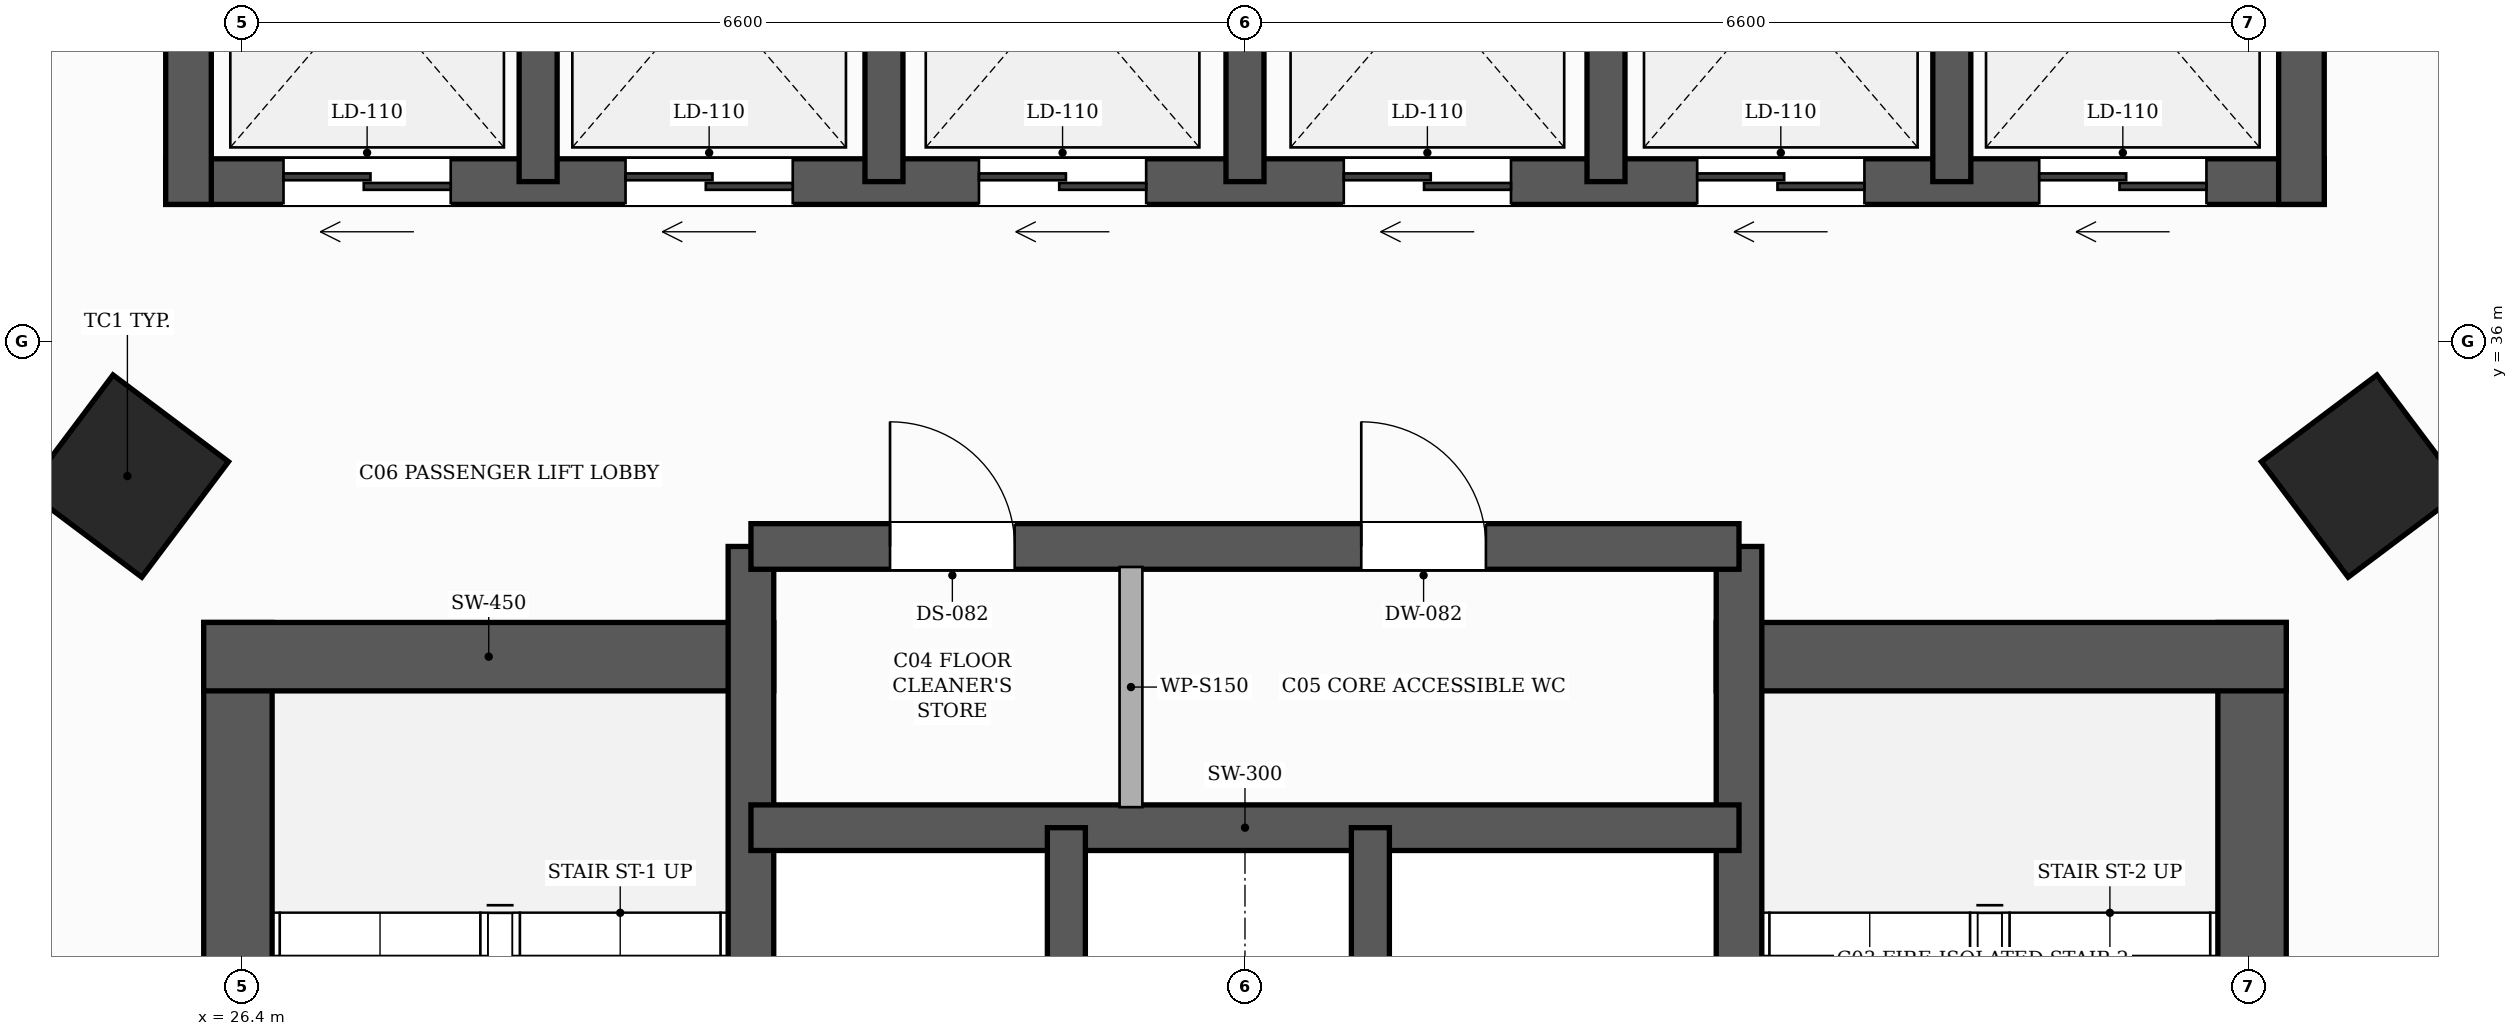
"""IFC4 building model, lengths in metres.
Left out: names, types, materials, properties, quantities, classifications, styles, units other than length and angle.
Written with IfcOpenShell. Run it as: python <this file> out.ifc"""

import sys

from ifc_helpers import new_model, si_unit, direction, frame, frame_2d, origin, origin_2d, place, context, subcontext, project, spatial, rectangle, hollow_rectangle, extrude, element, fill, save


model = new_model("IFC4")
c1 = context("Model", 3, precision=1e-05, world=origin(), true_north=direction((0.0, 1.0)))
c2 = subcontext(c1, "Body", "Model", "MODEL_VIEW")
j1 = project(units=[si_unit("LENGTHUNIT", "METRE"), si_unit("PLANEANGLEUNIT", "RADIAN")], contexts=[c1])
p1 = place(None, origin())
s1 = spatial("IfcSite", under=j1, at=p1, CompositionType="ELEMENT")
p2 = place(p1, origin())
s2 = spatial("IfcBuilding", under=s1, at=p2, CompositionType="ELEMENT")
p3 = place(p2, origin())
s3 = spatial("IfcBuildingStorey", under=s2, at=p3, CompositionType="ELEMENT", Elevation=0.0)
p4 = place(p3, frame((26.375, 26.45, 0.0), z_axis=(0.0, 0.0, 1.0), x_axis=(0.0, 1.0, 0.0)))
e1 = element("IfcWall", 1, at=p4, inside=s3, PredefinedType="SHEAR", context=c2, shape_type="SweptSolid", body=[
    extrude(rectangle(XDim=7.7, YDim=0.45, at=frame_2d((3.85, 0.0))), origin(), (0.0, 0.0, 1.0), 5.5),
])
p5 = place(p3, frame((26.15, 33.925, 0.0), z_axis=(0.0, 0.0, 1.0), x_axis=(1.0, 0.0, 0.0)))
e2 = element("IfcWall", 2, at=p5, inside=s3, PredefinedType="SHEAR", context=c2, shape_type="SweptSolid", body=[
    extrude(rectangle(XDim=3.75, YDim=0.45, at=frame_2d((1.875, 0.0))), origin(), (0.0, 0.0, 1.0), 5.5),
])
p6 = place(p3, frame((39.625, 26.45, 0.0), z_axis=(0.0, 0.0, 1.0), x_axis=(0.0, 1.0, 0.0)))
e3 = element("IfcWall", 3, at=p6, inside=s3, PredefinedType="SHEAR", context=c2, shape_type="SweptSolid", body=[
    extrude(rectangle(XDim=7.7, YDim=0.45, at=frame_2d((3.85, 0.0))), origin(), (0.0, 0.0, 1.0), 5.5),
])
p7 = place(p3, frame((36.1, 33.925, 0.0), z_axis=(0.0, 0.0, 1.0), x_axis=(1.0, 0.0, 0.0)))
e4 = element("IfcWall", 4, at=p7, inside=s3, PredefinedType="SHEAR", context=c2, shape_type="SweptSolid", body=[
    extrude(rectangle(XDim=3.75, YDim=0.45, at=frame_2d((1.875, 0.0))), origin(), (0.0, 0.0, 1.0), 5.5),
])
p8 = place(p3, frame((29.75, 26.45, 0.0), z_axis=(0.0, 0.0, 1.0), x_axis=(0.0, 1.0, 0.0)))
e5 = element("IfcWall", 5, at=p8, inside=s3, PredefinedType="SHEAR", context=c2, shape_type="SweptSolid", body=[
    extrude(rectangle(XDim=8.2, YDim=0.3, at=frame_2d((4.1, 0.0))), origin(), (0.0, 0.0, 1.0), 5.5),
])
p9 = place(p8, frame((0.6, 0.0, 0.0)))
e6 = element("IfcOpeningElement", 6, at=p9, cuts=e5, PredefinedType="OPENING", context=c2, shape_type="SweptSolid", body=[
    extrude(rectangle(XDim=1.05, YDim=2.15, at=frame_2d((0.525, 1.075))), frame((0.0, 0.16, 0.0), z_axis=(0.0, -1.0, 0.0), x_axis=(1.0, 0.0, 0.0)), (0.0, 0.0, 1.0), 0.32),
])
p10 = place(p3, frame((36.25, 26.45, 0.0), z_axis=(0.0, 0.0, 1.0), x_axis=(0.0, 1.0, 0.0)))
e7 = element("IfcWall", 7, at=p10, inside=s3, PredefinedType="SHEAR", context=c2, shape_type="SweptSolid", body=[
    extrude(rectangle(XDim=8.2, YDim=0.3, at=frame_2d((4.1, 0.0))), origin(), (0.0, 0.0, 1.0), 5.5),
])
p11 = place(p10, frame((0.6, 0.0, 0.0)))
e8 = element("IfcOpeningElement", 8, at=p11, cuts=e7, PredefinedType="OPENING", context=c2, shape_type="SweptSolid", body=[
    extrude(rectangle(XDim=1.05, YDim=2.15, at=frame_2d((0.525, 1.075))), frame((0.0, 0.16, 0.0), z_axis=(0.0, -1.0, 0.0), x_axis=(1.0, 0.0, 0.0)), (0.0, 0.0, 1.0), 0.32),
])
p12 = place(p3, frame((29.75, 32.8, 0.0), z_axis=(0.0, 0.0, 1.0), x_axis=(1.0, 0.0, 0.0)))
e9 = element("IfcWall", 9, at=p12, inside=s3, PredefinedType="SHEAR", context=c2, shape_type="SweptSolid", body=[
    extrude(rectangle(XDim=6.5, YDim=0.3, at=frame_2d((3.25, 0.0))), origin(), (0.0, 0.0, 1.0), 5.5),
])
for number, where, z_axis, x_axis in (
    (10, (31.825, 29.9, 0.0), (0.0, 0.0, 1.0), (0.0, 1.0, 0.0)),
    (11, (33.825, 29.9, 0.0), (0.0, 0.0, 1.0), (0.0, 1.0, 0.0)),
):
    element("IfcWall", number, at=place(p3, frame(where, z_axis=z_axis, x_axis=x_axis)), inside=s3, PredefinedType="SHEAR", context=c2, shape_type="SweptSolid", body=[
        extrude(rectangle(XDim=2.9, YDim=0.25, at=frame_2d((1.45, 0.0))), origin(), (0.0, 0.0, 1.0), 5.5),
    ])
p13 = place(p3, frame((29.75, 34.65, 0.0), z_axis=(0.0, 0.0, 1.0), x_axis=(1.0, 0.0, 0.0)))
e12 = element("IfcWall", 12, at=p13, inside=s3, PredefinedType="SHEAR", context=c2, shape_type="SweptSolid", body=[
    extrude(rectangle(XDim=6.5, YDim=0.3, at=frame_2d((3.25, 0.0))), origin(), (0.0, 0.0, 1.0), 5.5),
])
p14 = place(p13, frame((0.915, 0.0, 0.0)))
e13 = element("IfcOpeningElement", 13, at=p14, cuts=e12, PredefinedType="OPENING", context=c2, shape_type="SweptSolid", body=[
    extrude(rectangle(XDim=0.82, YDim=2.1, at=frame_2d((0.41, 1.05))), frame((0.0, 0.16, 0.0), z_axis=(0.0, -1.0, 0.0), x_axis=(1.0, 0.0, 0.0)), (0.0, 0.0, 1.0), 0.32),
])
p15 = place(p13, frame((4.015, 0.0, 0.0)))
e14 = element("IfcOpeningElement", 14, at=p15, cuts=e12, PredefinedType="OPENING", context=c2, shape_type="SweptSolid", body=[
    extrude(rectangle(XDim=0.82, YDim=2.1, at=frame_2d((0.41, 1.05))), frame((0.0, 0.16, 0.0), z_axis=(0.0, -1.0, 0.0), x_axis=(1.0, 0.0, 0.0)), (0.0, 0.0, 1.0), 0.32),
])
p16 = place(p3, frame((40.1, 37.05, 0.0), z_axis=(0.0, 0.0, 1.0), x_axis=(-1.0, 0.0, 0.0)))
e15 = element("IfcWall", 15, at=p16, inside=s3, PredefinedType="SHEAR", context=c2, shape_type="SweptSolid", body=[
    extrude(rectangle(XDim=14.2, YDim=0.3, at=frame_2d((7.1, 0.0))), origin(), (0.0, 0.0, 1.0), 5.5),
])
p17 = place(p16, frame((12.325, 0.0, 0.0)))
e16 = element("IfcOpeningElement", 16, at=p17, cuts=e15, PredefinedType="OPENING", context=c2, shape_type="SweptSolid", body=[
    extrude(rectangle(XDim=1.1, YDim=2.2, at=frame_2d((0.55, 1.1))), frame((0.0, 0.16, 0.0), z_axis=(0.0, -1.0, 0.0), x_axis=(1.0, 0.0, 0.0)), (0.0, 0.0, 1.0), 0.32),
])
p18 = place(p16, frame((0.775, 0.0, 0.0)))
e17 = element("IfcOpeningElement", 17, at=p18, cuts=e15, PredefinedType="OPENING", context=c2, shape_type="SweptSolid", body=[
    extrude(rectangle(XDim=1.1, YDim=2.2, at=frame_2d((0.55, 1.1))), frame((0.0, 0.16, 0.0), z_axis=(0.0, -1.0, 0.0), x_axis=(1.0, 0.0, 0.0)), (0.0, 0.0, 1.0), 0.32),
])
p19 = place(p16, frame((10.075, 0.0, 0.0)))
e18 = element("IfcOpeningElement", 18, at=p19, cuts=e15, PredefinedType="OPENING", context=c2, shape_type="SweptSolid", body=[
    extrude(rectangle(XDim=1.1, YDim=2.2, at=frame_2d((0.55, 1.1))), frame((0.0, 0.16, 0.0), z_axis=(0.0, -1.0, 0.0), x_axis=(1.0, 0.0, 0.0)), (0.0, 0.0, 1.0), 0.32),
])
p20 = place(p16, frame((3.025, 0.0, 0.0)))
e19 = element("IfcOpeningElement", 19, at=p20, cuts=e15, PredefinedType="OPENING", context=c2, shape_type="SweptSolid", body=[
    extrude(rectangle(XDim=1.1, YDim=2.2, at=frame_2d((0.55, 1.1))), frame((0.0, 0.16, 0.0), z_axis=(0.0, -1.0, 0.0), x_axis=(1.0, 0.0, 0.0)), (0.0, 0.0, 1.0), 0.32),
])
p21 = place(p16, frame((7.75, 0.0, 0.0)))
e20 = element("IfcOpeningElement", 20, at=p21, cuts=e15, PredefinedType="OPENING", context=c2, shape_type="SweptSolid", body=[
    extrude(rectangle(XDim=1.1, YDim=2.2, at=frame_2d((0.55, 1.1))), frame((0.0, 0.16, 0.0), z_axis=(0.0, -1.0, 0.0), x_axis=(1.0, 0.0, 0.0)), (0.0, 0.0, 1.0), 0.32),
])
p22 = place(p16, frame((5.35, 0.0, 0.0)))
e21 = element("IfcOpeningElement", 21, at=p22, cuts=e15, PredefinedType="OPENING", context=c2, shape_type="SweptSolid", body=[
    extrude(rectangle(XDim=1.1, YDim=2.2, at=frame_2d((0.55, 1.1))), frame((0.0, 0.16, 0.0), z_axis=(0.0, -1.0, 0.0), x_axis=(1.0, 0.0, 0.0)), (0.0, 0.0, 1.0), 0.32),
])
for number, where, z_axis, x_axis in (
    (22, (26.05, 36.9, 0.0), (0.0, 0.0, 1.0), (0.0, 1.0, 0.0)),
    (23, (39.95, 36.9, 0.0), (0.0, 0.0, 1.0), (0.0, 1.0, 0.0)),
):
    element("IfcWall", number, at=place(p3, frame(where, z_axis=z_axis, x_axis=x_axis)), inside=s3, PredefinedType="SHEAR", context=c2, shape_type="SweptSolid", body=[
        extrude(rectangle(XDim=2.85, YDim=0.3, at=frame_2d((1.425, 0.0))), origin(), (0.0, 0.0, 1.0), 5.5),
    ])
for number, where, z_axis, x_axis in (
    (24, (28.35, 37.05, 0.0), (0.0, 0.0, 1.0), (0.0, 1.0, 0.0)),
    (25, (30.625, 37.05, 0.0), (0.0, 0.0, 1.0), (0.0, 1.0, 0.0)),
    (26, (33.0, 37.05, 0.0), (0.0, 0.0, 1.0), (0.0, 1.0, 0.0)),
    (27, (35.375, 37.05, 0.0), (0.0, 0.0, 1.0), (0.0, 1.0, 0.0)),
    (28, (37.65, 37.05, 0.0), (0.0, 0.0, 1.0), (0.0, 1.0, 0.0)),
):
    element("IfcWall", number, at=place(p3, frame(where, z_axis=z_axis, x_axis=x_axis)), inside=s3, PredefinedType="SHEAR", context=c2, shape_type="SweptSolid", body=[
        extrude(rectangle(XDim=2.55, YDim=0.25, at=frame_2d((1.275, 0.0))), origin(), (0.0, 0.0, 1.0), 5.5),
    ])
for number, where, z_axis, x_axis in (
    (29, (25.648, 35.113, 0.0), (0.0, 0.0, 1.0), (0.6, 0.8, 0.0)),
    (30, (40.352, 35.113, 0.0), (0.0, 0.0, 1.0), (-0.6, 0.8, 0.0)),
):
    element("IfcColumn", number, at=place(p3, frame(where, z_axis=z_axis, x_axis=x_axis)), inside=s3, PredefinedType="COLUMN", context=c2, shape_type="SweptSolid", body=[
        extrude(hollow_rectangle(XDim=0.95, YDim=0.95, WallThickness=0.032, at=origin_2d()), origin(), (0.0, 0.0, 1.0), 5.5),
    ])
p23 = place(p3, frame((32.25, 32.935, 0.0), z_axis=(0.0, 0.0, 1.0), x_axis=(0.0, 1.0, 0.0)))
e31 = element("IfcWall", 31, at=p23, inside=s3, PredefinedType="PARTITIONING", context=c2, shape_type="SweptSolid", body=[
    extrude(rectangle(XDim=1.58, YDim=0.15, at=frame_2d((0.79, 0.0))), origin(), (0.0, 0.0, 1.0), 5.22),
])
p24 = place(p17, origin())
e32 = element("IfcDoor", 32, at=p24, inside=s3, OperationType="DOUBLE_DOOR_SLIDING", PredefinedType="DOOR", context=c2, shape_type="SweptSolid", body=[
    extrude(rectangle(XDim=1.1, YDim=2.2, at=frame_2d((0.55, 1.1))), frame((0.0, 0.025, 0.0), z_axis=(0.0, -1.0, 0.0), x_axis=(1.0, 0.0, 0.0)), (0.0, 0.0, 1.0), 0.05),
])
fill(e16, e32)
p25 = place(p18, origin())
e33 = element("IfcDoor", 33, at=p25, inside=s3, OperationType="DOUBLE_DOOR_SLIDING", PredefinedType="DOOR", context=c2, shape_type="SweptSolid", body=[
    extrude(rectangle(XDim=1.1, YDim=2.2, at=frame_2d((0.55, 1.1))), frame((0.0, 0.025, 0.0), z_axis=(0.0, -1.0, 0.0), x_axis=(1.0, 0.0, 0.0)), (0.0, 0.0, 1.0), 0.05),
])
fill(e17, e33)
p26 = place(p19, origin())
e34 = element("IfcDoor", 34, at=p26, inside=s3, OperationType="DOUBLE_DOOR_SLIDING", PredefinedType="DOOR", context=c2, shape_type="SweptSolid", body=[
    extrude(rectangle(XDim=1.1, YDim=2.2, at=frame_2d((0.55, 1.1))), frame((0.0, 0.025, 0.0), z_axis=(0.0, -1.0, 0.0), x_axis=(1.0, 0.0, 0.0)), (0.0, 0.0, 1.0), 0.05),
])
fill(e18, e34)
p27 = place(p20, origin())
e35 = element("IfcDoor", 35, at=p27, inside=s3, OperationType="DOUBLE_DOOR_SLIDING", PredefinedType="DOOR", context=c2, shape_type="SweptSolid", body=[
    extrude(rectangle(XDim=1.1, YDim=2.2, at=frame_2d((0.55, 1.1))), frame((0.0, 0.025, 0.0), z_axis=(0.0, -1.0, 0.0), x_axis=(1.0, 0.0, 0.0)), (0.0, 0.0, 1.0), 0.05),
])
fill(e19, e35)
p28 = place(p21, origin())
e36 = element("IfcDoor", 36, at=p28, inside=s3, OperationType="DOUBLE_DOOR_SLIDING", PredefinedType="DOOR", context=c2, shape_type="SweptSolid", body=[
    extrude(rectangle(XDim=1.1, YDim=2.2, at=frame_2d((0.55, 1.1))), frame((0.0, 0.025, 0.0), z_axis=(0.0, -1.0, 0.0), x_axis=(1.0, 0.0, 0.0)), (0.0, 0.0, 1.0), 0.05),
])
fill(e20, e36)
p29 = place(p22, origin())
e37 = element("IfcDoor", 37, at=p29, inside=s3, OperationType="DOUBLE_DOOR_SLIDING", PredefinedType="DOOR", context=c2, shape_type="SweptSolid", body=[
    extrude(rectangle(XDim=1.1, YDim=2.2, at=frame_2d((0.55, 1.1))), frame((0.0, 0.025, 0.0), z_axis=(0.0, -1.0, 0.0), x_axis=(1.0, 0.0, 0.0)), (0.0, 0.0, 1.0), 0.05),
])
fill(e21, e37)
p30 = place(p14, origin())
e38 = element("IfcDoor", 38, at=p30, inside=s3, OperationType="SINGLE_SWING_LEFT", PredefinedType="DOOR", context=c2, shape_type="SweptSolid", body=[
    extrude(rectangle(XDim=0.82, YDim=2.1, at=frame_2d((0.41, 1.05))), frame((0.0, 0.025, 0.0), z_axis=(0.0, -1.0, 0.0), x_axis=(1.0, 0.0, 0.0)), (0.0, 0.0, 1.0), 0.05),
])
fill(e13, e38)
p31 = place(p15, origin())
e39 = element("IfcDoor", 39, at=p31, inside=s3, OperationType="SINGLE_SWING_LEFT", PredefinedType="DOOR", context=c2, shape_type="SweptSolid", body=[
    extrude(rectangle(XDim=0.82, YDim=2.1, at=frame_2d((0.41, 1.05))), frame((0.0, 0.025, 0.0), z_axis=(0.0, -1.0, 0.0), x_axis=(1.0, 0.0, 0.0)), (0.0, 0.0, 1.0), 0.05),
])
fill(e14, e39)
save(model, sys.argv[1])
